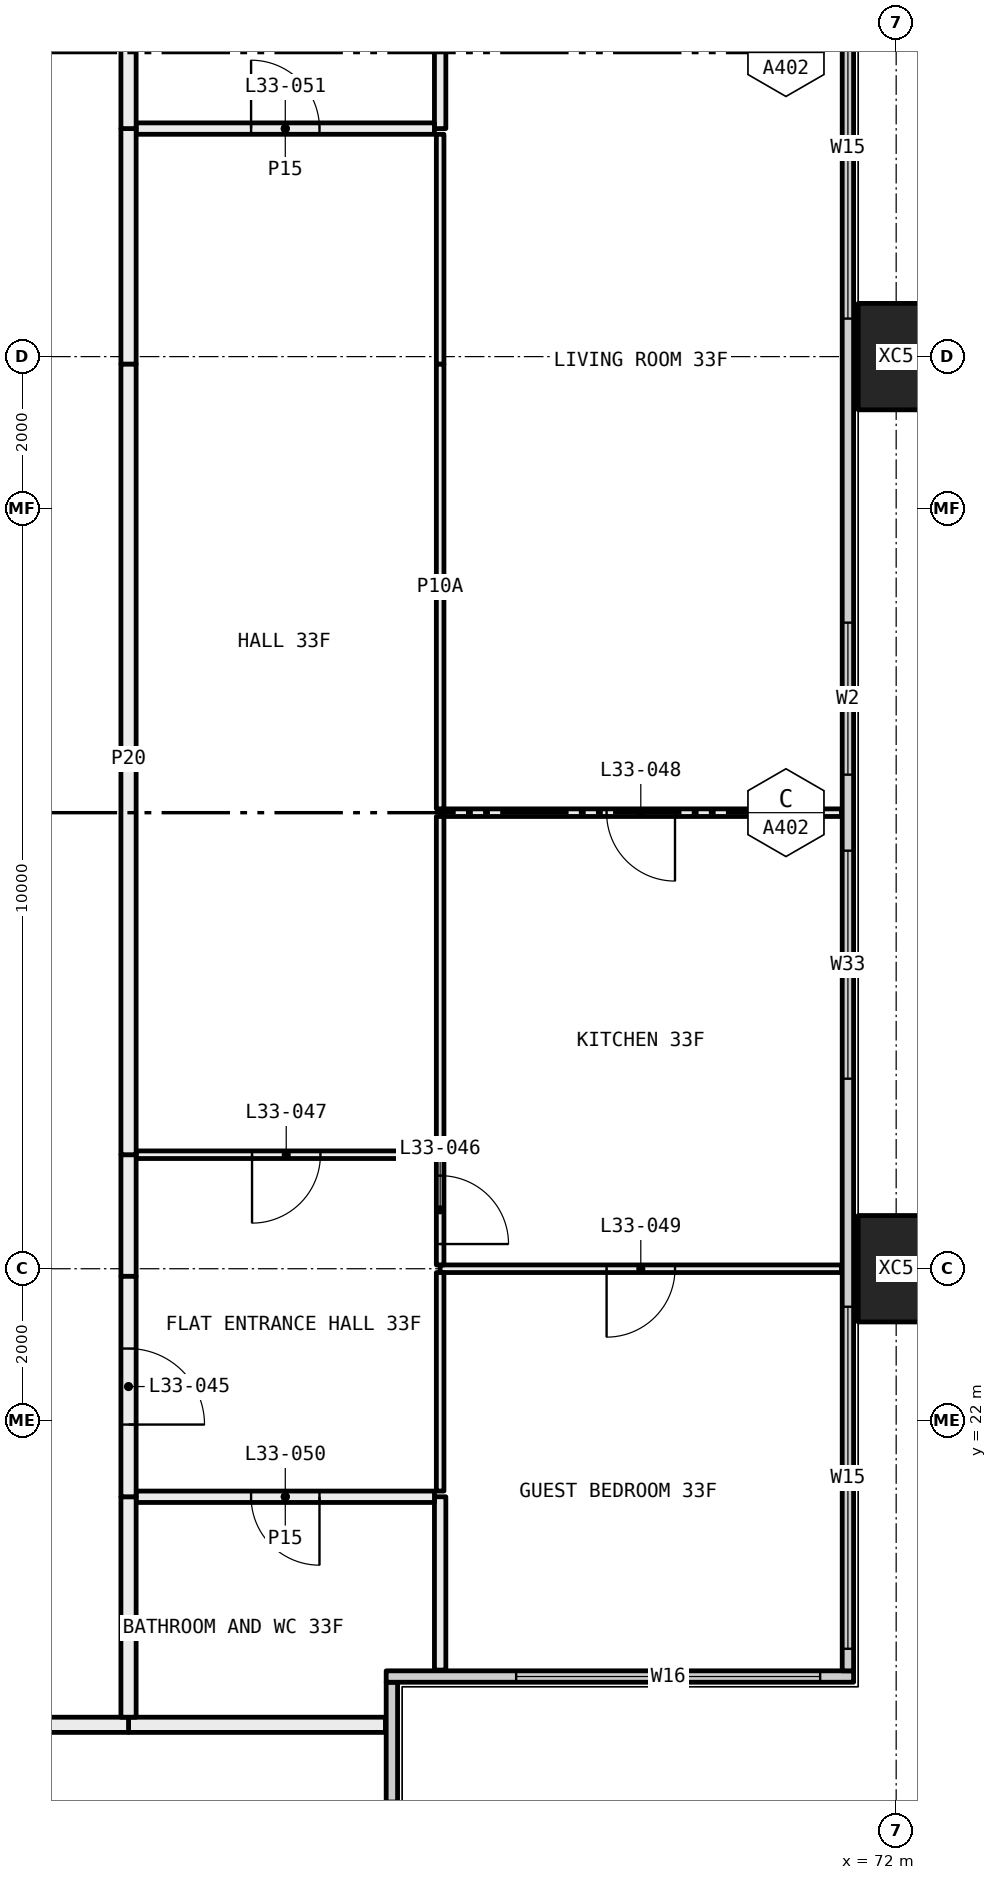
"""IFC4 building model, lengths in metres.
Left out: names, types, materials, properties, quantities, classifications, styles, units other than length and angle.
Written with IfcOpenShell. Run it as: python <this file> out.ifc"""

import sys

from ifc_helpers import new_model, si_unit, direction, frame, frame_2d, origin, origin_2d, place, context, subcontext, project, spatial, rectangle, hollow_rectangle, extrude, element, fill, save


model = new_model("IFC4")
c1 = context("Model", 3, precision=1e-05, world=origin(), true_north=direction((0.0, 1.0)))
c2 = subcontext(c1, "Body", "Model", "MODEL_VIEW")
j1 = project(units=[si_unit("LENGTHUNIT", "METRE"), si_unit("PLANEANGLEUNIT", "RADIAN")], contexts=[c1])
p1 = place(None, origin())
s1 = spatial("IfcSite", under=j1, at=p1, CompositionType="ELEMENT")
p2 = place(p1, origin())
s2 = spatial("IfcBuilding", under=s1, at=p2, CompositionType="ELEMENT")
p3 = place(p2, frame((0.0, 0.0, 127.65)))
s3 = spatial("IfcBuildingStorey", under=s2, at=p3, CompositionType="ELEMENT", Elevation=127.65)
for number, where, z_axis, x_axis in (
    (1, (72.0, 24.0, -0.4), (0.0, 0.0, 1.0), (0.0, 1.0, 0.0)),
    (2, (72.0, 36.0, -0.4), (0.0, 0.0, 1.0), (0.0, 1.0, 0.0)),
):
    element("IfcColumn", number, at=place(p3, frame(where, z_axis=z_axis, x_axis=x_axis)), inside=s3, PredefinedType="COLUMN", context=c2, shape_type="SweptSolid", body=[
        extrude(hollow_rectangle(XDim=1.4, YDim=1.0, WallThickness=0.055, at=origin_2d()), origin(), (0.0, 0.0, 1.0), 3.45),
    ])
p4 = place(p3, frame((65.365, 12.71, 0.0), z_axis=(0.0, 0.0, 1.0), x_axis=(0.0, 1.0, 0.0)))
e3 = element("IfcWall", 3, at=p4, inside=s3, PredefinedType="ELEMENTEDWALL", context=c2, shape_type="SweptSolid", body=[
    extrude(rectangle(XDim=5.85, YDim=0.15, at=frame_2d((2.925, 0.0))), origin(), (0.0, 0.0, 1.0), 3.05),
])
p5 = place(p4, frame((0.29, 0.0, 0.45)))
e4 = element("IfcOpeningElement", 4, at=p5, cuts=e3, PredefinedType="OPENING", context=c2, shape_type="SweptSolid", body=[
    extrude(rectangle(XDim=4.0, YDim=2.55, at=frame_2d((2.0, 1.275))), frame((0.0, 0.085, 0.0), z_axis=(0.0, -1.0, 0.0), x_axis=(1.0, 0.0, 0.0)), (0.0, 0.0, 1.0), 0.17),
])
p6 = place(p3, frame((65.29, 18.635, 0.0), z_axis=(0.0, 0.0, 1.0), x_axis=(1.0, 0.0, 0.0)))
e5 = element("IfcWall", 5, at=p6, inside=s3, PredefinedType="ELEMENTEDWALL", context=c2, shape_type="SweptSolid", body=[
    extrude(rectangle(XDim=6.15, YDim=0.15, at=frame_2d((3.075, 0.0))), origin(), (0.0, 0.0, 1.0), 3.05),
])
p7 = place(p6, frame((1.71, 0.0, 0.45)))
e6 = element("IfcOpeningElement", 6, at=p7, cuts=e5, PredefinedType="OPENING", context=c2, shape_type="SweptSolid", body=[
    extrude(rectangle(XDim=4.0, YDim=2.55, at=frame_2d((2.0, 1.275))), frame((0.0, 0.085, 0.0), z_axis=(0.0, -1.0, 0.0), x_axis=(1.0, 0.0, 0.0)), (0.0, 0.0, 1.0), 0.17),
])
p8 = place(p3, frame((71.365, 18.71, 0.0), z_axis=(0.0, 0.0, 1.0), x_axis=(0.0, 1.0, 0.0)))
e7 = element("IfcWall", 7, at=p8, inside=s3, PredefinedType="ELEMENTEDWALL", context=c2, shape_type="SweptSolid", body=[
    extrude(rectangle(XDim=22.58, YDim=0.15, at=frame_2d((11.29, 0.0))), origin(), (0.0, 0.0, 1.0), 3.05),
])
p9 = place(p8, frame((0.29, 0.0, 0.45)))
e8 = element("IfcOpeningElement", 8, at=p9, cuts=e7, PredefinedType="OPENING", context=c2, shape_type="SweptSolid", body=[
    extrude(rectangle(XDim=4.5, YDim=2.55, at=frame_2d((2.25, 1.275))), frame((0.0, 0.085, 0.0), z_axis=(0.0, -1.0, 0.0), x_axis=(1.0, 0.0, 0.0)), (0.0, 0.0, 1.0), 0.17),
])
p10 = place(p8, frame((7.79, 0.0, 0.45)))
e9 = element("IfcOpeningElement", 9, at=p10, cuts=e7, PredefinedType="OPENING", context=c2, shape_type="SweptSolid", body=[
    extrude(rectangle(XDim=3.0, YDim=2.55, at=frame_2d((1.5, 1.275))), frame((0.0, 0.085, 0.0), z_axis=(0.0, -1.0, 0.0), x_axis=(1.0, 0.0, 0.0)), (0.0, 0.0, 1.0), 0.17),
])
p11 = place(p8, frame((11.79, 0.0, 0.45)))
e10 = element("IfcOpeningElement", 10, at=p11, cuts=e7, PredefinedType="OPENING", context=c2, shape_type="SweptSolid", body=[
    extrude(rectangle(XDim=2.0, YDim=2.55, at=frame_2d((1.0, 1.275))), frame((0.0, 0.085, 0.0), z_axis=(0.0, -1.0, 0.0), x_axis=(1.0, 0.0, 0.0)), (0.0, 0.0, 1.0), 0.17),
])
p12 = place(p8, frame((17.79, 0.0, 0.45)))
e11 = element("IfcOpeningElement", 11, at=p12, cuts=e7, PredefinedType="OPENING", context=c2, shape_type="SweptSolid", body=[
    extrude(rectangle(XDim=4.5, YDim=2.55, at=frame_2d((2.25, 1.275))), frame((0.0, 0.085, 0.0), z_axis=(0.0, -1.0, 0.0), x_axis=(1.0, 0.0, 0.0)), (0.0, 0.0, 1.0), 0.17),
])
p13 = place(p3, frame((65.28, 18.0, 0.0), z_axis=(0.0, 0.0, 1.0), x_axis=(-1.0, 0.0, 0.0)))
e12 = element("IfcWall", 12, at=p13, inside=s3, PredefinedType="PARTITIONING", context=c2, shape_type="SweptSolid", body=[
    extrude(rectangle(XDim=3.38, YDim=0.2, at=frame_2d((1.69, 0.0))), origin(), (0.0, 0.0, 1.0), 3.05),
])
p14 = place(p3, frame((61.9, 18.0, 0.0), z_axis=(0.0, 0.0, 1.0), x_axis=(-1.0, 0.0, 0.0)))
e13 = element("IfcWall", 13, at=p14, inside=s3, PredefinedType="PARTITIONING", context=c2, shape_type="SweptSolid", body=[
    extrude(rectangle(XDim=1.9, YDim=0.2, at=frame_2d((0.95, 0.0))), origin(), (0.0, 0.0, 1.0), 3.05),
])
p15 = place(p3, frame((71.28, 24.0, 0.0), z_axis=(0.0, 0.0, 1.0), x_axis=(-1.0, 0.0, 0.0)))
e14 = element("IfcWall", 14, at=p15, inside=s3, PredefinedType="PARTITIONING", context=c2, shape_type="SweptSolid", body=[
    extrude(rectangle(XDim=5.28, YDim=0.1, at=frame_2d((2.64, 0.0))), origin(), (0.0, 0.0, 1.0), 2.45),
])
p16 = place(p15, frame((2.19, 0.0, 0.0)))
e15 = element("IfcOpeningElement", 15, at=p16, cuts=e14, PredefinedType="OPENING", context=c2, shape_type="SweptSolid", body=[
    extrude(rectangle(XDim=0.9, YDim=2.1, at=frame_2d((0.45, 1.05))), frame((0.0, 0.06, 0.0), z_axis=(0.0, -1.0, 0.0), x_axis=(1.0, 0.0, 0.0)), (0.0, 0.0, 1.0), 0.12),
])
p17 = place(p3, frame((66.0, 21.0, 0.0), z_axis=(0.0, 0.0, 1.0), x_axis=(0.0, -1.0, 0.0)))
e16 = element("IfcWall", 16, at=p17, inside=s3, PredefinedType="PARTITIONING", context=c2, shape_type="SweptSolid", body=[
    extrude(rectangle(XDim=2.28, YDim=0.15, at=frame_2d((1.14, 0.0))), origin(), (0.0, 0.0, 1.0), 3.05),
])
p18 = place(p3, frame((66.0, 23.95, 0.0), z_axis=(0.0, 0.0, 1.0), x_axis=(0.0, -1.0, 0.0)))
e17 = element("IfcWall", 17, at=p18, inside=s3, PredefinedType="PARTITIONING", context=c2, shape_type="SweptSolid", body=[
    extrude(rectangle(XDim=2.875, YDim=0.1, at=frame_2d((1.438, 0.0))), origin(), (0.0, 0.0, 1.0), 2.45),
])
p19 = place(p3, frame((71.28, 30.0, 0.0), z_axis=(0.0, 0.0, 1.0), x_axis=(-1.0, 0.0, 0.0)))
e18 = element("IfcWall", 18, at=p19, inside=s3, PredefinedType="PARTITIONING", context=c2, shape_type="SweptSolid", body=[
    extrude(rectangle(XDim=5.28, YDim=0.1, at=frame_2d((2.64, 0.0))), origin(), (0.0, 0.0, 1.0), 3.05),
])
p20 = place(p19, frame((2.19, 0.0, 0.0)))
e19 = element("IfcOpeningElement", 19, at=p20, cuts=e18, PredefinedType="OPENING", context=c2, shape_type="SweptSolid", body=[
    extrude(rectangle(XDim=0.9, YDim=2.1, at=frame_2d((0.45, 1.05))), frame((0.0, 0.06, 0.0), z_axis=(0.0, -1.0, 0.0), x_axis=(1.0, 0.0, 0.0)), (0.0, 0.0, 1.0), 0.12),
])
p21 = place(p3, frame((66.0, 25.5, 0.0), z_axis=(0.0, 0.0, 1.0), x_axis=(0.0, -1.0, 0.0)))
e20 = element("IfcWall", 20, at=p21, inside=s3, PredefinedType="PARTITIONING", context=c2, shape_type="SweptSolid", body=[
    extrude(rectangle(XDim=1.45, YDim=0.1, at=frame_2d((0.725, 0.0))), origin(), (0.0, 0.0, 1.0), 2.45),
])
p22 = place(p21, frame((0.275, 0.0, 0.0)))
e21 = element("IfcOpeningElement", 21, at=p22, cuts=e20, PredefinedType="OPENING", context=c2, shape_type="SweptSolid", body=[
    extrude(rectangle(XDim=0.9, YDim=2.1, at=frame_2d((0.45, 1.05))), frame((0.0, 0.06, 0.0), z_axis=(0.0, -1.0, 0.0), x_axis=(1.0, 0.0, 0.0)), (0.0, 0.0, 1.0), 0.12),
])
p23 = place(p3, frame((66.0, 29.95, 0.0), z_axis=(0.0, 0.0, 1.0), x_axis=(0.0, -1.0, 0.0)))
e22 = element("IfcWall", 22, at=p23, inside=s3, PredefinedType="PARTITIONING", context=c2, shape_type="SweptSolid", body=[
    extrude(rectangle(XDim=4.45, YDim=0.1, at=frame_2d((2.225, 0.0))), origin(), (0.0, 0.0, 1.0), 3.05),
])
p24 = place(p3, frame((66.0, 38.925, 0.0), z_axis=(0.0, 0.0, 1.0), x_axis=(0.0, -1.0, 0.0)))
e23 = element("IfcWall", 23, at=p24, inside=s3, PredefinedType="PARTITIONING", context=c2, shape_type="SweptSolid", body=[
    extrude(rectangle(XDim=3.025, YDim=0.1, at=frame_2d((1.513, 0.0))), origin(), (0.0, 0.0, 1.0), 2.45),
])
p25 = place(p3, frame((66.0, 35.9, 0.0), z_axis=(0.0, 0.0, 1.0), x_axis=(0.0, -1.0, 0.0)))
e24 = element("IfcWall", 24, at=p25, inside=s3, PredefinedType="PARTITIONING", context=c2, shape_type="SweptSolid", body=[
    extrude(rectangle(XDim=5.85, YDim=0.1, at=frame_2d((2.925, 0.0))), origin(), (0.0, 0.0, 1.0), 3.05),
])
p26 = place(p3, frame((66.0, 41.28, 0.0), z_axis=(0.0, 0.0, 1.0), x_axis=(0.0, -1.0, 0.0)))
e25 = element("IfcWall", 25, at=p26, inside=s3, PredefinedType="PARTITIONING", context=c2, shape_type="SweptSolid", body=[
    extrude(rectangle(XDim=2.28, YDim=0.15, at=frame_2d((1.14, 0.0))), origin(), (0.0, 0.0, 1.0), 3.05),
])
p27 = place(p3, frame((65.925, 21.0, 0.0), z_axis=(0.0, 0.0, 1.0), x_axis=(-1.0, 0.0, 0.0)))
e26 = element("IfcWall", 26, at=p27, inside=s3, PredefinedType="PARTITIONING", context=c2, shape_type="SweptSolid", body=[
    extrude(rectangle(XDim=3.925, YDim=0.15, at=frame_2d((1.962, 0.0))), origin(), (0.0, 0.0, 1.0), 3.05),
])
p28 = place(p27, frame((1.512, 0.0, 0.0)))
e27 = element("IfcOpeningElement", 27, at=p28, cuts=e26, PredefinedType="OPENING", context=c2, shape_type="SweptSolid", body=[
    extrude(rectangle(XDim=0.9, YDim=2.1, at=frame_2d((0.45, 1.05))), frame((0.0, 0.085, 0.0), z_axis=(0.0, -1.0, 0.0), x_axis=(1.0, 0.0, 0.0)), (0.0, 0.0, 1.0), 0.17),
])
p29 = place(p3, frame((61.9, 21.0, 0.0), z_axis=(0.0, 0.0, 1.0), x_axis=(0.0, -1.0, 0.0)))
e28 = element("IfcWall", 28, at=p29, inside=s3, PredefinedType="PARTITIONING", context=c2, shape_type="SweptSolid", body=[
    extrude(rectangle(XDim=2.9, YDim=0.2, at=frame_2d((1.45, 0.0))), origin(), (0.0, 0.0, 1.0), 3.05),
])
p30 = place(p3, frame((65.95, 25.5, 0.0), z_axis=(0.0, 0.0, 1.0), x_axis=(-1.0, 0.0, 0.0)))
e29 = element("IfcWall", 29, at=p30, inside=s3, PredefinedType="PARTITIONING", context=c2, shape_type="SweptSolid", body=[
    extrude(rectangle(XDim=3.95, YDim=0.1, at=frame_2d((1.975, 0.0))), origin(), (0.0, 0.0, 1.0), 3.05),
])
p31 = place(p30, frame((1.525, 0.0, 0.0)))
e30 = element("IfcOpeningElement", 30, at=p31, cuts=e29, PredefinedType="OPENING", context=c2, shape_type="SweptSolid", body=[
    extrude(rectangle(XDim=0.9, YDim=2.1, at=frame_2d((0.45, 1.05))), frame((0.0, 0.06, 0.0), z_axis=(0.0, -1.0, 0.0), x_axis=(1.0, 0.0, 0.0)), (0.0, 0.0, 1.0), 0.12),
])
p32 = place(p3, frame((61.9, 25.5, 0.0), z_axis=(0.0, 0.0, 1.0), x_axis=(0.0, -1.0, 0.0)))
e31 = element("IfcWall", 31, at=p32, inside=s3, PredefinedType="PARTITIONING", context=c2, shape_type="SweptSolid", body=[
    extrude(rectangle(XDim=1.6, YDim=0.2, at=frame_2d((0.8, 0.0))), origin(), (0.0, 0.0, 1.0), 2.45),
])
p33 = place(p3, frame((61.9, 23.9, 0.0), z_axis=(0.0, 0.0, 1.0), x_axis=(0.0, -1.0, 0.0)))
e32 = element("IfcWall", 32, at=p33, inside=s3, PredefinedType="PARTITIONING", context=c2, shape_type="SweptSolid", body=[
    extrude(rectangle(XDim=2.9, YDim=0.2, at=frame_2d((1.45, 0.0))), origin(), (0.0, 0.0, 1.0), 3.05),
])
p34 = place(p33, frame((0.95, 0.0, 0.0)))
e33 = element("IfcOpeningElement", 33, at=p34, cuts=e32, PredefinedType="OPENING", context=c2, shape_type="SweptSolid", body=[
    extrude(rectangle(XDim=1.0, YDim=2.1, at=frame_2d((0.5, 1.05))), frame((0.0, 0.11, 0.0), z_axis=(0.0, -1.0, 0.0), x_axis=(1.0, 0.0, 0.0)), (0.0, 0.0, 1.0), 0.22),
])
p35 = place(p3, frame((65.925, 39.0, 0.0), z_axis=(0.0, 0.0, 1.0), x_axis=(-1.0, 0.0, 0.0)))
e34 = element("IfcWall", 34, at=p35, inside=s3, PredefinedType="PARTITIONING", context=c2, shape_type="SweptSolid", body=[
    extrude(rectangle(XDim=3.925, YDim=0.15, at=frame_2d((1.962, 0.0))), origin(), (0.0, 0.0, 1.0), 3.05),
])
p36 = place(p35, frame((1.512, 0.0, 0.0)))
e35 = element("IfcOpeningElement", 35, at=p36, cuts=e34, PredefinedType="OPENING", context=c2, shape_type="SweptSolid", body=[
    extrude(rectangle(XDim=0.9, YDim=2.1, at=frame_2d((0.45, 1.05))), frame((0.0, 0.085, 0.0), z_axis=(0.0, -1.0, 0.0), x_axis=(1.0, 0.0, 0.0)), (0.0, 0.0, 1.0), 0.17),
])
p37 = place(p3, frame((61.9, 39.0, 0.0), z_axis=(0.0, 0.0, 1.0), x_axis=(0.0, -1.0, 0.0)))
e36 = element("IfcWall", 36, at=p37, inside=s3, PredefinedType="PARTITIONING", context=c2, shape_type="SweptSolid", body=[
    extrude(rectangle(XDim=3.1, YDim=0.2, at=frame_2d((1.55, 0.0))), origin(), (0.0, 0.0, 1.0), 2.45),
])
p38 = place(p3, frame((61.9, 35.9, 0.0), z_axis=(0.0, 0.0, 1.0), x_axis=(0.0, -1.0, 0.0)))
e37 = element("IfcWall", 37, at=p38, inside=s3, PredefinedType="PARTITIONING", context=c2, shape_type="SweptSolid", body=[
    extrude(rectangle(XDim=10.4, YDim=0.2, at=frame_2d((5.2, 0.0))), origin(), (0.0, 0.0, 1.0), 3.05),
])
p39 = place(p3, frame((61.9, 41.9, 0.0), z_axis=(0.0, 0.0, 1.0), x_axis=(0.0, -1.0, 0.0)))
e38 = element("IfcWall", 38, at=p39, inside=s3, PredefinedType="PARTITIONING", context=c2, shape_type="SweptSolid", body=[
    extrude(rectangle(XDim=2.9, YDim=0.2, at=frame_2d((1.45, 0.0))), origin(), (0.0, 0.0, 1.0), 3.05),
])
p40 = place(p7, origin())
e39 = element("IfcWindow", 39, at=p40, inside=s3, PartitioningType="SINGLE_PANEL", PredefinedType="WINDOW", context=c2, shape_type="SweptSolid", body=[
    extrude(rectangle(XDim=4.0, YDim=2.55, at=frame_2d((2.0, 1.275))), frame((0.0, 0.03, 0.0), z_axis=(0.0, -1.0, 0.0), x_axis=(1.0, 0.0, 0.0)), (0.0, 0.0, 1.0), 0.06),
])
fill(e6, e39)
p41 = place(p9, origin())
e40 = element("IfcWindow", 40, at=p41, inside=s3, PartitioningType="SINGLE_PANEL", PredefinedType="WINDOW", context=c2, shape_type="SweptSolid", body=[
    extrude(rectangle(XDim=4.5, YDim=2.55, at=frame_2d((2.25, 1.275))), frame((0.0, 0.03, 0.0), z_axis=(0.0, -1.0, 0.0), x_axis=(1.0, 0.0, 0.0)), (0.0, 0.0, 1.0), 0.06),
])
fill(e8, e40)
p42 = place(p10, origin())
e41 = element("IfcWindow", 41, at=p42, inside=s3, PartitioningType="SINGLE_PANEL", PredefinedType="WINDOW", context=c2, shape_type="SweptSolid", body=[
    extrude(rectangle(XDim=3.0, YDim=2.55, at=frame_2d((1.5, 1.275))), frame((0.0, 0.03, 0.0), z_axis=(0.0, -1.0, 0.0), x_axis=(1.0, 0.0, 0.0)), (0.0, 0.0, 1.0), 0.06),
])
fill(e9, e41)
p43 = place(p11, origin())
e42 = element("IfcWindow", 42, at=p43, inside=s3, PartitioningType="SINGLE_PANEL", PredefinedType="WINDOW", context=c2, shape_type="SweptSolid", body=[
    extrude(rectangle(XDim=2.0, YDim=2.55, at=frame_2d((1.0, 1.275))), frame((0.0, 0.03, 0.0), z_axis=(0.0, -1.0, 0.0), x_axis=(1.0, 0.0, 0.0)), (0.0, 0.0, 1.0), 0.06),
])
fill(e10, e42)
p44 = place(p12, origin())
e43 = element("IfcWindow", 43, at=p44, inside=s3, PartitioningType="SINGLE_PANEL", PredefinedType="WINDOW", context=c2, shape_type="SweptSolid", body=[
    extrude(rectangle(XDim=4.5, YDim=2.55, at=frame_2d((2.25, 1.275))), frame((0.0, 0.03, 0.0), z_axis=(0.0, -1.0, 0.0), x_axis=(1.0, 0.0, 0.0)), (0.0, 0.0, 1.0), 0.06),
])
fill(e11, e43)
p45 = place(p34, origin())
e44 = element("IfcDoor", 44, at=p45, inside=s3, OperationType="SINGLE_SWING_LEFT", PredefinedType="DOOR", context=c2, shape_type="SweptSolid", body=[
    extrude(rectangle(XDim=1.0, YDim=2.1, at=frame_2d((0.5, 1.05))), frame((0.0, 0.025, 0.0), z_axis=(0.0, -1.0, 0.0), x_axis=(1.0, 0.0, 0.0)), (0.0, 0.0, 1.0), 0.05),
])
fill(e33, e44)
p46 = place(p22, origin())
e45 = element("IfcDoor", 45, at=p46, inside=s3, OperationType="SINGLE_SWING_LEFT", PredefinedType="DOOR", context=c2, shape_type="SweptSolid", body=[
    extrude(rectangle(XDim=0.9, YDim=2.1, at=frame_2d((0.45, 1.05))), frame((0.0, 0.025, 0.0), z_axis=(0.0, -1.0, 0.0), x_axis=(1.0, 0.0, 0.0)), (0.0, 0.0, 1.0), 0.05),
])
fill(e21, e45)
p47 = place(p31, origin())
e46 = element("IfcDoor", 46, at=p47, inside=s3, OperationType="SINGLE_SWING_LEFT", PredefinedType="DOOR", context=c2, shape_type="SweptSolid", body=[
    extrude(rectangle(XDim=0.9, YDim=2.1, at=frame_2d((0.45, 1.05))), frame((0.0, 0.025, 0.0), z_axis=(0.0, -1.0, 0.0), x_axis=(1.0, 0.0, 0.0)), (0.0, 0.0, 1.0), 0.05),
])
fill(e30, e46)
p48 = place(p20, origin())
e47 = element("IfcDoor", 47, at=p48, inside=s3, OperationType="SINGLE_SWING_RIGHT", PredefinedType="DOOR", context=c2, shape_type="SweptSolid", body=[
    extrude(rectangle(XDim=0.9, YDim=2.1, at=frame_2d((0.45, 1.05))), frame((0.0, 0.025, 0.0), z_axis=(0.0, -1.0, 0.0), x_axis=(1.0, 0.0, 0.0)), (0.0, 0.0, 1.0), 0.05),
])
fill(e19, e47)
p49 = place(p16, origin())
e48 = element("IfcDoor", 48, at=p49, inside=s3, OperationType="SINGLE_SWING_LEFT", PredefinedType="DOOR", context=c2, shape_type="SweptSolid", body=[
    extrude(rectangle(XDim=0.9, YDim=2.1, at=frame_2d((0.45, 1.05))), frame((0.0, 0.025, 0.0), z_axis=(0.0, -1.0, 0.0), x_axis=(1.0, 0.0, 0.0)), (0.0, 0.0, 1.0), 0.05),
])
fill(e15, e48)
p50 = place(p28, origin())
e49 = element("IfcDoor", 49, at=p50, inside=s3, OperationType="SINGLE_SWING_RIGHT", PredefinedType="DOOR", context=c2, shape_type="SweptSolid", body=[
    extrude(rectangle(XDim=0.9, YDim=2.1, at=frame_2d((0.45, 1.05))), frame((0.0, 0.025, 0.0), z_axis=(0.0, -1.0, 0.0), x_axis=(1.0, 0.0, 0.0)), (0.0, 0.0, 1.0), 0.05),
])
fill(e27, e49)
p51 = place(p36, frame((0.9, 0.0, 0.0), x_axis=(-1.0, 0.0, 0.0)))
e50 = element("IfcDoor", 50, at=p51, inside=s3, OperationType="SINGLE_SWING_RIGHT", PredefinedType="DOOR", context=c2, shape_type="SweptSolid", body=[
    extrude(rectangle(XDim=0.9, YDim=2.1, at=frame_2d((0.45, 1.05))), frame((0.0, 0.025, 0.0), z_axis=(0.0, -1.0, 0.0), x_axis=(1.0, 0.0, 0.0)), (0.0, 0.0, 1.0), 0.05),
])
fill(e35, e50)
save(model, sys.argv[1])
